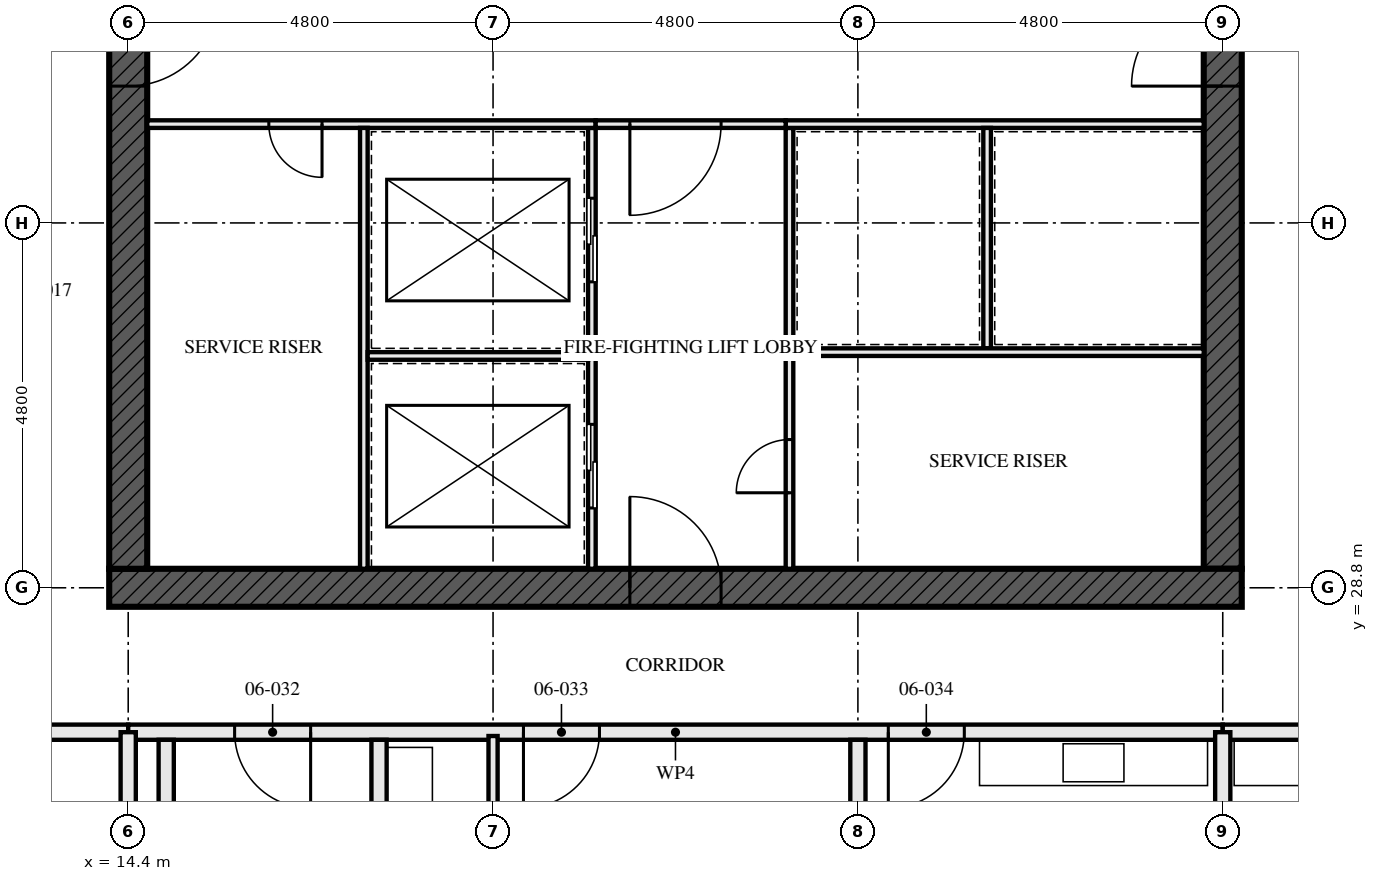
"""IFC4 building model, lengths in metres.
Left out: names, types, materials, properties, quantities, classifications, styles, units other than length and angle.
Written with IfcOpenShell. Run it as: python <this file> out.ifc"""

import sys

from ifc_helpers import new_model, si_unit, direction, frame, frame_2d, origin, place, context, subcontext, project, spatial, rectangle, extrude, element, fill, save


model = new_model("IFC4")
c1 = context("Model", 3, precision=1e-05, world=origin(), true_north=direction((0.0, 1.0)))
c2 = subcontext(c1, "Body", "Model", "MODEL_VIEW")
j1 = project(units=[si_unit("LENGTHUNIT", "METRE"), si_unit("PLANEANGLEUNIT", "RADIAN")], contexts=[c1])
p1 = place(None, origin())
s1 = spatial("IfcSite", under=j1, at=p1, CompositionType="ELEMENT")
p2 = place(p1, origin())
s2 = spatial("IfcBuilding", under=s1, at=p2, CompositionType="ELEMENT")
p3 = place(p2, frame((0.0, 0.0, 27.0)))
s3 = spatial("IfcBuildingStorey", under=s2, at=p3, CompositionType="ELEMENT", Elevation=27.0)
p4 = place(p3, frame((14.15, 28.8, -0.17), z_axis=(0.0, 0.0, 1.0), x_axis=(1.0, 0.0, 0.0)))
e1 = element("IfcWall", 1, at=p4, inside=s3, PredefinedType="SHEAR", context=c2, shape_type="SweptSolid", body=[
    extrude(rectangle(XDim=14.9, YDim=0.5, at=frame_2d((7.45, 0.0))), origin(), (0.0, 0.0, 1.0), 3.5),
])
p5 = place(p4, frame((6.85, 0.0, 0.17)))
e2 = element("IfcOpeningElement", 2, at=p5, cuts=e1, PredefinedType="OPENING", context=c2, shape_type="SweptSolid", body=[
    extrude(rectangle(XDim=1.2, YDim=2.1, at=frame_2d((0.6, 1.05))), frame((0.0, 0.26, 0.0), z_axis=(0.0, -1.0, 0.0), x_axis=(1.0, 0.0, 0.0)), (0.0, 0.0, 1.0), 0.521),
])
p6 = place(p3, frame((14.4, 42.95, -0.17), z_axis=(0.0, 0.0, 1.0), x_axis=(0.0, -1.0, 0.0)))
e3 = element("IfcWall", 3, at=p6, inside=s3, PredefinedType="SHEAR", context=c2, shape_type="SweptSolid", body=[
    extrude(rectangle(XDim=13.9, YDim=0.5, at=frame_2d((6.95, 0.0))), origin(), (0.0, 0.0, 1.0), 3.5),
])
p7 = place(p6, frame((6.35, 0.0, 0.17)))
e4 = element("IfcOpeningElement", 4, at=p7, cuts=e3, PredefinedType="OPENING", context=c2, shape_type="SweptSolid", body=[
    extrude(rectangle(XDim=1.2, YDim=2.1, at=frame_2d((0.6, 1.05))), frame((0.0, 0.26, 0.0), z_axis=(0.0, -1.0, 0.0), x_axis=(1.0, 0.0, 0.0)), (0.0, 0.0, 1.0), 0.521),
])
p8 = place(p3, frame((28.8, 29.05, -0.17), z_axis=(0.0, 0.0, 1.0), x_axis=(0.0, 1.0, 0.0)))
e5 = element("IfcWall", 5, at=p8, inside=s3, PredefinedType="SHEAR", context=c2, shape_type="SweptSolid", body=[
    extrude(rectangle(XDim=13.9, YDim=0.5, at=frame_2d((6.95, 0.0))), origin(), (0.0, 0.0, 1.0), 3.5),
])
p9 = place(p8, frame((6.35, 0.0, 0.17)))
e6 = element("IfcOpeningElement", 6, at=p9, cuts=e5, PredefinedType="OPENING", context=c2, shape_type="SweptSolid", body=[
    extrude(rectangle(XDim=1.2, YDim=2.1, at=frame_2d((0.6, 1.05))), frame((0.0, 0.26, 0.0), z_axis=(0.0, -1.0, 0.0), x_axis=(1.0, 0.0, 0.0)), (0.0, 0.0, 1.0), 0.521),
])
p10 = place(p3, frame((4.8, 26.9, 0.0), z_axis=(0.0, 0.0, 1.0), x_axis=(1.0, 0.0, 0.0)))
e7 = element("IfcWall", 7, at=p10, inside=s3, PredefinedType="PARTITIONING", context=c2, shape_type="SweptSolid", body=[
    extrude(rectangle(XDim=9.6, YDim=0.2, at=frame_2d((4.8, 0.0))), origin(), (0.0, 0.0, 1.0), 3.33),
])
p11 = place(p10, frame((0.4, 0.0, 0.0)))
e8 = element("IfcOpeningElement", 8, at=p11, cuts=e7, PredefinedType="OPENING", context=c2, shape_type="SweptSolid", body=[
    extrude(rectangle(XDim=1.0, YDim=2.1, at=frame_2d((0.5, 1.05))), frame((0.0, 0.111, 0.0), z_axis=(0.0, -1.0, 0.0), x_axis=(1.0, 0.0, 0.0)), (0.0, 0.0, 1.0), 0.221),
])
p12 = place(p10, frame((5.2, 0.0, 0.0)))
e9 = element("IfcOpeningElement", 9, at=p12, cuts=e7, PredefinedType="OPENING", context=c2, shape_type="SweptSolid", body=[
    extrude(rectangle(XDim=1.0, YDim=2.1, at=frame_2d((0.5, 1.05))), frame((0.0, 0.111, 0.0), z_axis=(0.0, -1.0, 0.0), x_axis=(1.0, 0.0, 0.0)), (0.0, 0.0, 1.0), 0.221),
])
for number, where, z_axis, x_axis in (
    (10, (14.9, 22.1, 0.0), (0.0, 0.0, 1.0), (0.0, 1.0, 0.0)),
    (11, (17.7, 22.1, 0.0), (0.0, 0.0, 1.0), (0.0, 1.0, 0.0)),
):
    element("IfcWall", number, at=place(p3, frame(where, z_axis=z_axis, x_axis=x_axis)), inside=s3, PredefinedType="SOLIDWALL", context=c2, shape_type="SweptSolid", body=[
        extrude(rectangle(XDim=4.7, YDim=0.2, at=frame_2d((2.35, 0.0))), origin(), (0.0, 0.0, 1.0), 2.99),
    ])
p13 = place(p3, frame((19.2, 20.8, 0.0), z_axis=(0.0, 0.0, 1.0), x_axis=(0.0, 1.0, 0.0)))
e12 = element("IfcWall", 12, at=p13, inside=s3, PredefinedType="PARTITIONING", context=c2, shape_type="SweptSolid", body=[
    extrude(rectangle(XDim=6.05, YDim=0.12, at=frame_2d((3.025, 0.0))), origin(), (0.0, 0.0, 1.0), 2.55),
])
p14 = place(p13, frame((2.575, 0.0, 0.0)))
e13 = element("IfcOpeningElement", 13, at=p14, cuts=e12, PredefinedType="OPENING", context=c2, shape_type="SweptSolid", body=[
    extrude(rectangle(XDim=0.9, YDim=2.1, at=frame_2d((0.45, 1.05))), frame((0.0, 0.071, 0.0), z_axis=(0.0, -1.0, 0.0), x_axis=(1.0, 0.0, 0.0)), (0.0, 0.0, 1.0), 0.141),
])
p15 = place(p3, frame((24.0, 14.795, 0.0), z_axis=(0.0, 0.0, 1.0), x_axis=(0.0, 1.0, 0.0)))
e14 = element("IfcWall", 14, at=p15, inside=s3, PredefinedType="PARTITIONING", context=c2, shape_type="SweptSolid", body=[
    extrude(rectangle(XDim=12.005, YDim=0.2, at=frame_2d((6.002, 0.0))), origin(), (0.0, 0.0, 1.0), 2.55),
])
p16 = place(p3, frame((14.4, 26.9, 0.0), z_axis=(0.0, 0.0, 1.0), x_axis=(1.0, 0.0, 0.0)))
e15 = element("IfcWall", 15, at=p16, inside=s3, PredefinedType="PARTITIONING", context=c2, shape_type="SweptSolid", body=[
    extrude(rectangle(XDim=14.4, YDim=0.2, at=frame_2d((7.2, 0.0))), origin(), (0.0, 0.0, 1.0), 2.55),
])
p17 = place(p16, frame((1.4, 0.0, 0.0)))
e16 = element("IfcOpeningElement", 16, at=p17, cuts=e15, PredefinedType="OPENING", context=c2, shape_type="SweptSolid", body=[
    extrude(rectangle(XDim=1.0, YDim=2.1, at=frame_2d((0.5, 1.05))), frame((0.0, 0.111, 0.0), z_axis=(0.0, -1.0, 0.0), x_axis=(1.0, 0.0, 0.0)), (0.0, 0.0, 1.0), 0.221),
])
p18 = place(p16, frame((5.2, 0.0, 0.0)))
e17 = element("IfcOpeningElement", 17, at=p18, cuts=e15, PredefinedType="OPENING", context=c2, shape_type="SweptSolid", body=[
    extrude(rectangle(XDim=1.0, YDim=2.1, at=frame_2d((0.5, 1.05))), frame((0.0, 0.111, 0.0), z_axis=(0.0, -1.0, 0.0), x_axis=(1.0, 0.0, 0.0)), (0.0, 0.0, 1.0), 0.221),
])
p19 = place(p16, frame((10.0, 0.0, 0.0)))
e18 = element("IfcOpeningElement", 18, at=p19, cuts=e15, PredefinedType="OPENING", context=c2, shape_type="SweptSolid", body=[
    extrude(rectangle(XDim=1.0, YDim=2.1, at=frame_2d((0.5, 1.05))), frame((0.0, 0.111, 0.0), z_axis=(0.0, -1.0, 0.0), x_axis=(1.0, 0.0, 0.0)), (0.0, 0.0, 1.0), 0.221),
])
p20 = place(p3, frame((28.8, 26.9, 0.0), z_axis=(0.0, 0.0, 1.0), x_axis=(1.0, 0.0, 0.0)))
e19 = element("IfcWall", 19, at=p20, inside=s3, PredefinedType="PARTITIONING", context=c2, shape_type="SweptSolid", body=[
    extrude(rectangle(XDim=9.6, YDim=0.2, at=frame_2d((4.8, 0.0))), origin(), (0.0, 0.0, 1.0), 3.33),
])
p21 = place(p20, frame((5.2, 0.0, 0.0)))
e20 = element("IfcOpeningElement", 20, at=p21, cuts=e19, PredefinedType="OPENING", context=c2, shape_type="SweptSolid", body=[
    extrude(rectangle(XDim=1.0, YDim=2.1, at=frame_2d((0.5, 1.05))), frame((0.0, 0.111, 0.0), z_axis=(0.0, -1.0, 0.0), x_axis=(1.0, 0.0, 0.0)), (0.0, 0.0, 1.0), 0.221),
])
p22 = place(p3, frame((20.5, 29.05, 0.0), z_axis=(0.0, 0.0, 1.0), x_axis=(0.0, 1.0, 0.0)))
e21 = element("IfcWall", 21, at=p22, inside=s3, PredefinedType="SOLIDWALL", context=c2, shape_type="SweptSolid", body=[
    extrude(rectangle(XDim=5.8, YDim=0.1, at=frame_2d((2.9, 0.0))), origin(), (0.0, 0.0, 1.0), 3.33),
])
p23 = place(p22, frame((0.8, 0.0, 0.0)))
e22 = element("IfcOpeningElement", 22, at=p23, cuts=e21, PredefinedType="OPENING", context=c2, shape_type="SweptSolid", body=[
    extrude(rectangle(XDim=1.1, YDim=2.3, at=frame_2d((0.55, 1.15))), frame((0.0, 0.061, 0.0), z_axis=(0.0, -1.0, 0.0), x_axis=(1.0, 0.0, 0.0)), (0.0, 0.0, 1.0), 0.121),
])
p24 = place(p22, frame((3.775, 0.0, 0.0)))
e23 = element("IfcOpeningElement", 23, at=p24, cuts=e21, PredefinedType="OPENING", context=c2, shape_type="SweptSolid", body=[
    extrude(rectangle(XDim=1.1, YDim=2.3, at=frame_2d((0.55, 1.15))), frame((0.0, 0.061, 0.0), z_axis=(0.0, -1.0, 0.0), x_axis=(1.0, 0.0, 0.0)), (0.0, 0.0, 1.0), 0.121),
])
p25 = place(p3, frame((23.1, 29.05, 0.0), z_axis=(0.0, 0.0, 1.0), x_axis=(0.0, 1.0, 0.0)))
e24 = element("IfcWall", 24, at=p25, inside=s3, PredefinedType="SOLIDWALL", context=c2, shape_type="SweptSolid", body=[
    extrude(rectangle(XDim=5.8, YDim=0.1, at=frame_2d((2.9, 0.0))), origin(), (0.0, 0.0, 1.0), 3.33),
])
p26 = place(p25, frame((1.0, 0.0, 0.0)))
e25 = element("IfcOpeningElement", 25, at=p26, cuts=e24, PredefinedType="OPENING", context=c2, shape_type="SweptSolid", body=[
    extrude(rectangle(XDim=0.7, YDim=2.1, at=frame_2d((0.35, 1.05))), frame((0.0, 0.061, 0.0), z_axis=(0.0, -1.0, 0.0), x_axis=(1.0, 0.0, 0.0)), (0.0, 0.0, 1.0), 0.121),
])
p27 = place(p3, frame((14.65, 34.9, 0.0), z_axis=(0.0, 0.0, 1.0), x_axis=(1.0, 0.0, 0.0)))
e26 = element("IfcWall", 26, at=p27, inside=s3, PredefinedType="SOLIDWALL", context=c2, shape_type="SweptSolid", body=[
    extrude(rectangle(XDim=5.9, YDim=0.1, at=frame_2d((2.95, 0.0))), origin(), (0.0, 0.0, 1.0), 3.33),
])
p28 = place(p27, frame((1.6, 0.0, 0.0)))
e27 = element("IfcOpeningElement", 27, at=p28, cuts=e26, PredefinedType="OPENING", context=c2, shape_type="SweptSolid", body=[
    extrude(rectangle(XDim=0.7, YDim=2.1, at=frame_2d((0.35, 1.05))), frame((0.0, 0.061, 0.0), z_axis=(0.0, -1.0, 0.0), x_axis=(1.0, 0.0, 0.0)), (0.0, 0.0, 1.0), 0.121),
])
p29 = place(p3, frame((23.05, 34.9, 0.0), z_axis=(0.0, 0.0, 1.0), x_axis=(1.0, 0.0, 0.0)))
e28 = element("IfcWall", 28, at=p29, inside=s3, PredefinedType="SOLIDWALL", context=c2, shape_type="SweptSolid", body=[
    extrude(rectangle(XDim=5.5, YDim=0.1, at=frame_2d((2.75, 0.0))), origin(), (0.0, 0.0, 1.0), 3.33),
])
p30 = place(p3, frame((20.55, 34.9, 0.0), z_axis=(0.0, 0.0, 1.0), x_axis=(1.0, 0.0, 0.0)))
e29 = element("IfcWall", 29, at=p30, inside=s3, PredefinedType="SOLIDWALL", context=c2, shape_type="SweptSolid", body=[
    extrude(rectangle(XDim=2.5, YDim=0.1, at=frame_2d((1.25, 0.0))), origin(), (0.0, 0.0, 1.0), 3.33),
])
p31 = place(p30, frame((0.45, 0.0, 0.0)))
e30 = element("IfcOpeningElement", 30, at=p31, cuts=e29, PredefinedType="OPENING", context=c2, shape_type="SweptSolid", body=[
    extrude(rectangle(XDim=1.2, YDim=2.1, at=frame_2d((0.6, 1.05))), frame((0.0, 0.061, 0.0), z_axis=(0.0, -1.0, 0.0), x_axis=(1.0, 0.0, 0.0)), (0.0, 0.0, 1.0), 0.121),
])
p32 = place(p3, frame((17.5, 29.05, 0.0), z_axis=(0.0, 0.0, 1.0), x_axis=(0.0, 1.0, 0.0)))
e31 = element("IfcWall", 31, at=p32, inside=s3, PredefinedType="SOLIDWALL", context=c2, shape_type="SweptSolid", body=[
    extrude(rectangle(XDim=5.8, YDim=0.1, at=frame_2d((2.9, 0.0))), origin(), (0.0, 0.0, 1.0), 3.33),
])
p33 = place(p3, frame((17.55, 31.85, 0.0), z_axis=(0.0, 0.0, 1.0), x_axis=(1.0, 0.0, 0.0)))
e32 = element("IfcWall", 32, at=p33, inside=s3, PredefinedType="SOLIDWALL", context=c2, shape_type="SweptSolid", body=[
    extrude(rectangle(XDim=2.9, YDim=0.1, at=frame_2d((1.45, 0.0))), origin(), (0.0, 0.0, 1.0), 3.33),
])
p34 = place(p3, frame((25.7, 31.95, 0.0), z_axis=(0.0, 0.0, 1.0), x_axis=(0.0, 1.0, 0.0)))
e33 = element("IfcWall", 33, at=p34, inside=s3, PredefinedType="SOLIDWALL", context=c2, shape_type="SweptSolid", body=[
    extrude(rectangle(XDim=2.9, YDim=0.1, at=frame_2d((1.45, 0.0))), origin(), (0.0, 0.0, 1.0), 3.33),
])
p35 = place(p3, frame((23.15, 31.9, 0.0), z_axis=(0.0, 0.0, 1.0), x_axis=(1.0, 0.0, 0.0)))
e34 = element("IfcWall", 34, at=p35, inside=s3, PredefinedType="SOLIDWALL", context=c2, shape_type="SweptSolid", body=[
    extrude(rectangle(XDim=5.4, YDim=0.1, at=frame_2d((2.7, 0.0))), origin(), (0.0, 0.0, 1.0), 3.33),
])
for number, where, z_axis, x_axis in (
    (35, (14.4, 24.395, 0.0), (0.0, 0.0, 1.0), (0.0, 1.0, 0.0)),
    (36, (28.8, 24.395, 0.0), (0.0, 0.0, 1.0), (0.0, 1.0, 0.0)),
):
    element("IfcWall", number, at=place(p3, frame(where, z_axis=z_axis, x_axis=x_axis)), inside=s3, PredefinedType="PARTITIONING", context=c2, shape_type="SweptSolid", body=[
        extrude(rectangle(XDim=2.505, YDim=0.2, at=frame_2d((1.252, 0.0))), origin(), (0.0, 0.0, 1.0), 2.32),
    ])
p36 = place(p17, frame((1.0, 0.0, 0.0), z_axis=(0.0, 0.0, 1.0), x_axis=(-1.0, 0.0, 0.0)))
e37 = element("IfcDoor", 37, at=p36, inside=s3, OperationType="SINGLE_SWING_RIGHT", PredefinedType="DOOR", context=c2, shape_type="SweptSolid", body=[
    extrude(rectangle(XDim=1.0, YDim=2.1, at=frame_2d((0.5, 1.05))), frame((0.0, 0.032, 0.0), z_axis=(0.0, -1.0, 0.0), x_axis=(1.0, 0.0, 0.0)), (0.0, 0.0, 1.0), 0.064),
])
fill(e16, e37)
p37 = place(p18, frame((1.0, 0.0, 0.0), z_axis=(0.0, 0.0, 1.0), x_axis=(-1.0, 0.0, 0.0)))
e38 = element("IfcDoor", 38, at=p37, inside=s3, OperationType="SINGLE_SWING_LEFT", PredefinedType="DOOR", context=c2, shape_type="SweptSolid", body=[
    extrude(rectangle(XDim=1.0, YDim=2.1, at=frame_2d((0.5, 1.05))), frame((0.0, 0.027, 0.0), z_axis=(0.0, -1.0, 0.0), x_axis=(1.0, 0.0, 0.0)), (0.0, 0.0, 1.0), 0.054),
])
fill(e17, e38)
p38 = place(p19, frame((1.0, 0.0, 0.0), z_axis=(0.0, 0.0, 1.0), x_axis=(-1.0, 0.0, 0.0)))
e39 = element("IfcDoor", 39, at=p38, inside=s3, OperationType="SINGLE_SWING_LEFT", PredefinedType="DOOR", context=c2, shape_type="SweptSolid", body=[
    extrude(rectangle(XDim=1.0, YDim=2.1, at=frame_2d((0.5, 1.05))), frame((0.0, 0.027, 0.0), z_axis=(0.0, -1.0, 0.0), x_axis=(1.0, 0.0, 0.0)), (0.0, 0.0, 1.0), 0.054),
])
fill(e18, e39)
p39 = place(p23, origin())
e40 = element("IfcDoor", 40, at=p39, inside=s3, OperationType="SLIDING_TO_LEFT", PredefinedType="DOOR", context=c2, shape_type="SweptSolid", body=[
    extrude(rectangle(XDim=1.1, YDim=2.3, at=frame_2d((0.55, 1.15))), frame((0.0, 0.05, 0.0), z_axis=(0.0, -1.0, 0.0), x_axis=(1.0, 0.0, 0.0)), (0.0, 0.0, 1.0), 0.1),
])
fill(e22, e40)
p40 = place(p24, origin())
e41 = element("IfcDoor", 41, at=p40, inside=s3, OperationType="SLIDING_TO_LEFT", PredefinedType="DOOR", context=c2, shape_type="SweptSolid", body=[
    extrude(rectangle(XDim=1.1, YDim=2.3, at=frame_2d((0.55, 1.15))), frame((0.0, 0.05, 0.0), z_axis=(0.0, -1.0, 0.0), x_axis=(1.0, 0.0, 0.0)), (0.0, 0.0, 1.0), 0.1),
])
fill(e23, e41)
p41 = place(p26, origin())
e42 = element("IfcDoor", 42, at=p41, inside=s3, OperationType="SINGLE_SWING_RIGHT", PredefinedType="DOOR", context=c2, shape_type="SweptSolid", body=[
    extrude(rectangle(XDim=0.7, YDim=2.1, at=frame_2d((0.35, 1.05))), frame((0.0, 0.027, 0.0), z_axis=(0.0, -1.0, 0.0), x_axis=(1.0, 0.0, 0.0)), (0.0, 0.0, 1.0), 0.054),
])
fill(e25, e42)
p42 = place(p28, frame((0.7, 0.0, 0.0), z_axis=(0.0, 0.0, 1.0), x_axis=(-1.0, 0.0, 0.0)))
e43 = element("IfcDoor", 43, at=p42, inside=s3, OperationType="SINGLE_SWING_RIGHT", PredefinedType="DOOR", context=c2, shape_type="SweptSolid", body=[
    extrude(rectangle(XDim=0.7, YDim=2.1, at=frame_2d((0.35, 1.05))), frame((0.0, 0.027, 0.0), z_axis=(0.0, -1.0, 0.0), x_axis=(1.0, 0.0, 0.0)), (0.0, 0.0, 1.0), 0.054),
])
fill(e27, e43)
p43 = place(p31, frame((1.2, 0.0, 0.0), z_axis=(0.0, 0.0, 1.0), x_axis=(-1.0, 0.0, 0.0)))
e44 = element("IfcDoor", 44, at=p43, inside=s3, OperationType="SINGLE_SWING_LEFT", PredefinedType="DOOR", context=c2, shape_type="SweptSolid", body=[
    extrude(rectangle(XDim=1.2, YDim=2.1, at=frame_2d((0.6, 1.05))), frame((0.0, 0.027, 0.0), z_axis=(0.0, -1.0, 0.0), x_axis=(1.0, 0.0, 0.0)), (0.0, 0.0, 1.0), 0.054),
])
fill(e30, e44)
p44 = place(p5, origin())
e45 = element("IfcDoor", 45, at=p44, inside=s3, OperationType="SINGLE_SWING_LEFT", PredefinedType="DOOR", context=c2, shape_type="SweptSolid", body=[
    extrude(rectangle(XDim=1.2, YDim=2.1, at=frame_2d((0.6, 1.05))), frame((0.0, 0.027, 0.0), z_axis=(0.0, -1.0, 0.0), x_axis=(1.0, 0.0, 0.0)), (0.0, 0.0, 1.0), 0.054),
])
fill(e2, e45)
p45 = place(p7, origin())
e46 = element("IfcDoor", 46, at=p45, inside=s3, OperationType="SINGLE_SWING_LEFT", PredefinedType="DOOR", context=c2, shape_type="SweptSolid", body=[
    extrude(rectangle(XDim=1.2, YDim=2.1, at=frame_2d((0.6, 1.05))), frame((0.0, 0.027, 0.0), z_axis=(0.0, -1.0, 0.0), x_axis=(1.0, 0.0, 0.0)), (0.0, 0.0, 1.0), 0.054),
])
fill(e4, e46)
p46 = place(p9, origin())
e47 = element("IfcDoor", 47, at=p46, inside=s3, OperationType="SINGLE_SWING_LEFT", PredefinedType="DOOR", context=c2, shape_type="SweptSolid", body=[
    extrude(rectangle(XDim=1.2, YDim=2.1, at=frame_2d((0.6, 1.05))), frame((0.0, 0.027, 0.0), z_axis=(0.0, -1.0, 0.0), x_axis=(1.0, 0.0, 0.0)), (0.0, 0.0, 1.0), 0.054),
])
fill(e6, e47)
save(model, sys.argv[1])
